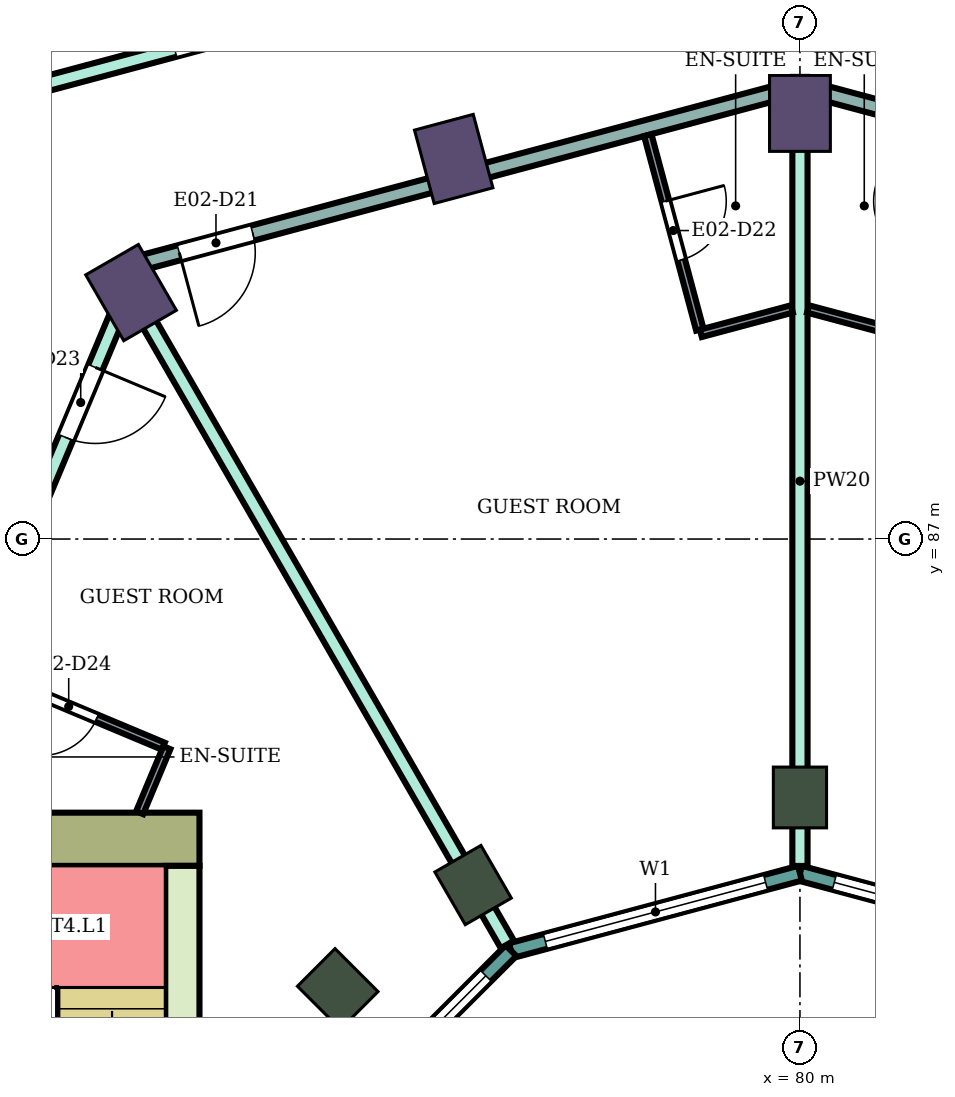
"""IFC4 building model, lengths in metres.
Left out: names, types, materials, properties, quantities, classifications, styles, units other than length and angle.
Written with IfcOpenShell. Run it as: python <this file> out.ifc"""

import sys

from ifc_helpers import new_model, si_unit, direction, frame, frame_2d, origin, origin_2d, place, context, subcontext, project, spatial, rectangle, extrude, element, fill, save


model = new_model("IFC4")
c1 = context("Model", 3, precision=1e-05, world=origin(), true_north=direction((0.0, 1.0)))
c2 = subcontext(c1, "Body", "Model", "MODEL_VIEW")
j1 = project(units=[si_unit("LENGTHUNIT", "METRE"), si_unit("PLANEANGLEUNIT", "RADIAN")], contexts=[c1])
p1 = place(None, origin())
s1 = spatial("IfcSite", under=j1, at=p1, CompositionType="ELEMENT")
p2 = place(p1, origin())
s2 = spatial("IfcBuilding", under=s1, at=p2, CompositionType="ELEMENT")
p3 = place(p2, frame((0.0, 0.0, 130.2)))
s3 = spatial("IfcBuildingStorey", under=s2, at=p3, CompositionType="ELEMENT", Elevation=130.2)
for number, where, z_axis, x_axis in (
    (1, (80.0, 92.6, 0.0), (0.0, 0.0, 1.0), (0.0, 1.0, 0.0)),
    (2, (75.445, 92.0, 0.0), (0.0, 0.0, 1.0), (-0.259, 0.966, 0.0)),
    (3, (71.2, 90.242, 0.0), (0.0, 0.0, 1.0), (-0.5, 0.866, 0.0)),
):
    element("IfcColumn", number, at=place(p3, frame(where, z_axis=z_axis, x_axis=x_axis)), inside=s3, PredefinedType="COLUMN", context=c2, shape_type="SweptSolid", body=[
        extrude(rectangle(XDim=1.0, YDim=0.8, at=origin_2d()), origin(), (0.0, 0.0, 1.0), 3.9),
    ])
for number, where, z_axis, x_axis in (
    (4, (80.0, 83.6, 0.0), (0.0, 0.0, 1.0), (0.0, 1.0, 0.0)),
    (5, (75.7, 82.448, 0.0), (0.0, 0.0, 1.0), (-0.5, 0.866, 0.0)),
    (6, (73.919, 81.081, 0.0), (0.0, 0.0, 1.0), (-0.707, 0.707, 0.0)),
):
    element("IfcColumn", number, at=place(p3, frame(where, z_axis=z_axis, x_axis=x_axis)), inside=s3, PredefinedType="COLUMN", context=c2, shape_type="SweptSolid", body=[
        extrude(rectangle(XDim=0.8, YDim=0.7, at=origin_2d()), origin(), (0.0, 0.0, 1.0), 3.9),
    ])
p4 = place(p3, frame((72.1, 83.05, 0.0), z_axis=(0.0, 0.0, 1.0), x_axis=(-1.0, 0.0, 0.0)))
e7 = element("IfcWall", 7, at=p4, inside=s3, PredefinedType="SHEAR", context=c2, shape_type="SweptSolid", body=[
    extrude(rectangle(XDim=14.8, YDim=0.7, at=frame_2d((7.4, 0.0))), origin(), (0.0, 0.0, 1.0), 3.58),
])
p5 = place(p4, frame((4.2, 0.0, 0.0)))
e8 = element("IfcOpeningElement", 8, at=p5, cuts=e7, PredefinedType="OPENING", context=c2, shape_type="SweptSolid", body=[
    extrude(rectangle(XDim=2.4, YDim=2.4, at=frame_2d((1.2, 1.2))), frame((0.0, 0.36, 0.0), z_axis=(0.0, -1.0, 0.0), x_axis=(1.0, 0.0, 0.0)), (0.0, 0.0, 1.0), 0.72),
])
p6 = place(p3, frame((71.875, 82.7, 0.0), z_axis=(0.0, 0.0, 1.0), x_axis=(0.0, -1.0, 0.0)))
e9 = element("IfcWall", 9, at=p6, inside=s3, PredefinedType="SHEAR", context=c2, shape_type="SweptSolid", body=[
    extrude(rectangle(XDim=7.7, YDim=0.45, at=frame_2d((3.85, 0.0))), origin(), (0.0, 0.0, 1.0), 3.58),
])
p7 = place(p3, frame((83.802, 81.585, 0.0), z_axis=(0.0, 0.0, 1.0), x_axis=(-0.965933654434, 0.258789828301, 0.0)))
e10 = element("IfcWall", 10, at=p7, inside=s3, PredefinedType="NOTDEFINED", context=c2, shape_type="SweptSolid", body=[
    extrude(rectangle(XDim=3.936, YDim=0.2, at=frame_2d((1.968, 0.0))), origin(), (0.0, 0.0, 1.0), 3.9),
])
p8 = place(p7, frame((0.468, 0.0, 0.9)))
e11 = element("IfcOpeningElement", 11, at=p8, cuts=e10, PredefinedType="OPENING", context=c2, shape_type="SweptSolid", body=[
    extrude(rectangle(XDim=3.0, YDim=2.3, at=frame_2d((1.5, 1.15))), frame((0.0, 0.11, 0.0), z_axis=(0.0, -1.0, 0.0), x_axis=(1.0, 0.0, 0.0)), (0.0, 0.0, 1.0), 0.22),
])
p9 = place(p3, frame((80.0, 82.604, 0.0), z_axis=(0.0, 0.0, 1.0), x_axis=(-0.965933654434, -0.258789828301, 0.0)))
e12 = element("IfcWall", 12, at=p9, inside=s3, PredefinedType="NOTDEFINED", context=c2, shape_type="SweptSolid", body=[
    extrude(rectangle(XDim=3.936, YDim=0.2, at=frame_2d((1.968, 0.0))), origin(), (0.0, 0.0, 1.0), 3.9),
])
p10 = place(p9, frame((0.468, 0.0, 0.9)))
e13 = element("IfcOpeningElement", 13, at=p10, cuts=e12, PredefinedType="OPENING", context=c2, shape_type="SweptSolid", body=[
    extrude(rectangle(XDim=3.0, YDim=2.3, at=frame_2d((1.5, 1.15))), frame((0.0, 0.11, 0.0), z_axis=(0.0, -1.0, 0.0), x_axis=(1.0, 0.0, 0.0)), (0.0, 0.0, 1.0), 0.22),
])
p11 = place(p3, frame((76.198, 81.585, 0.0), z_axis=(0.0, 0.0, 1.0), x_axis=(-0.707106781187, -0.707106781187, 0.0)))
e14 = element("IfcWall", 14, at=p11, inside=s3, PredefinedType="NOTDEFINED", context=c2, shape_type="SweptSolid", body=[
    extrude(rectangle(XDim=3.936, YDim=0.2, at=frame_2d((1.968, 0.0))), origin(), (0.0, 0.0, 1.0), 3.9),
])
p12 = place(p11, frame((0.468, 0.0, 0.9)))
e15 = element("IfcOpeningElement", 15, at=p12, cuts=e14, PredefinedType="OPENING", context=c2, shape_type="SweptSolid", body=[
    extrude(rectangle(XDim=3.0, YDim=2.3, at=frame_2d((1.5, 1.15))), frame((0.0, 0.11, 0.0), z_axis=(0.0, -1.0, 0.0), x_axis=(1.0, 0.0, 0.0)), (0.0, 0.0, 1.0), 0.22),
])
p13 = place(p3, frame((68.277, 83.4, 0.0), z_axis=(0.0, 0.0, 1.0), x_axis=(0.386454861164, 0.922308321703, 0.0)))
e16 = element("IfcWall", 16, at=p13, inside=s3, PredefinedType="PARTITIONING", context=c2, shape_type="SweptSolid", body=[
    extrude(rectangle(XDim=7.762, YDim=0.2, at=frame_2d((3.881, 0.0))), origin(), (0.0, 0.0, 1.0), 3.45),
])
p14 = place(p13, frame((5.351, 0.0, 0.0)))
e17 = element("IfcOpeningElement", 17, at=p14, cuts=e16, PredefinedType="OPENING", context=c2, shape_type="SweptSolid", body=[
    extrude(rectangle(XDim=1.0, YDim=2.1, at=frame_2d((0.5, 1.05))), frame((0.0, 0.11, 0.0), z_axis=(0.0, -1.0, 0.0), x_axis=(1.0, 0.0, 0.0)), (0.0, 0.0, 1.0), 0.22),
])
p15 = place(p3, frame((69.397, 92.805, 0.0), z_axis=(0.0, 0.0, 1.0), x_axis=(0.965971666602, 0.258647906087, 0.0)))
e18 = element("IfcWall", 18, at=p15, inside=s3, PredefinedType="PARTITIONING", context=c2, shape_type="SweptSolid", body=[
    extrude(rectangle(XDim=10.887, YDim=0.2, at=frame_2d((5.443, 0.0))), origin(), (0.0, 0.0, 1.0), 3.45),
])
p16 = place(p15, frame((6.163, 0.0, 0.0)))
e19 = element("IfcOpeningElement", 19, at=p16, cuts=e18, PredefinedType="OPENING", context=c2, shape_type="SweptSolid", body=[
    extrude(rectangle(XDim=1.0, YDim=2.1, at=frame_2d((0.5, 1.05))), frame((0.0, 0.11, 0.0), z_axis=(0.0, -1.0, 0.0), x_axis=(1.0, 0.0, 0.0)), (0.0, 0.0, 1.0), 0.22),
])
p17 = place(p15, frame((2.461, 0.0, 0.0)))
e20 = element("IfcOpeningElement", 20, at=p17, cuts=e18, PredefinedType="OPENING", context=c2, shape_type="SweptSolid", body=[
    extrude(rectangle(XDim=1.0, YDim=2.1, at=frame_2d((0.5, 1.05))), frame((0.0, 0.11, 0.0), z_axis=(0.0, -1.0, 0.0), x_axis=(1.0, 0.0, 0.0)), (0.0, 0.0, 1.0), 0.22),
])
p18 = place(p3, frame((71.263, 90.135, 0.0), z_axis=(0.0, 0.0, 1.0), x_axis=(0.499869438034, -0.86610077065, 0.0)))
e21 = element("IfcWall", 21, at=p18, inside=s3, PredefinedType="PARTITIONING", context=c2, shape_type="SweptSolid", body=[
    extrude(rectangle(XDim=9.777, YDim=0.2, at=frame_2d((4.889, 0.0))), origin(), (0.0, 0.0, 1.0), 3.45),
])
p19 = place(p3, frame((71.303, 90.625, 0.0), z_axis=(0.0, 0.0, 1.0), x_axis=(0.965971868307, 0.258647152776, 0.0)))
e22 = element("IfcWall", 22, at=p19, inside=s3, PredefinedType="PARTITIONING", context=c2, shape_type="SweptSolid", body=[
    extrude(rectangle(XDim=8.874, YDim=0.2, at=frame_2d((4.437, 0.0))), origin(), (0.0, 0.0, 1.0), 3.08),
])
p20 = place(p19, frame((0.55, 0.0, 0.0)))
e23 = element("IfcOpeningElement", 23, at=p20, cuts=e22, PredefinedType="OPENING", context=c2, shape_type="SweptSolid", body=[
    extrude(rectangle(XDim=1.0, YDim=2.1, at=frame_2d((0.5, 1.05))), frame((0.0, 0.11, 0.0), z_axis=(0.0, -1.0, 0.0), x_axis=(1.0, 0.0, 0.0)), (0.0, 0.0, 1.0), 0.22),
])
p21 = place(p3, frame((80.0, 82.699, 0.0), z_axis=(0.0, 0.0, 1.0), x_axis=(0.0, 1.0, 0.0)))
e24 = element("IfcWall", 24, at=p21, inside=s3, PredefinedType="PARTITIONING", context=c2, shape_type="SweptSolid", body=[
    extrude(rectangle(XDim=10.125, YDim=0.2, at=frame_2d((5.062, 0.0))), origin(), (0.0, 0.0, 1.0), 3.45),
])
p22 = place(p3, frame((80.0, 92.954, 0.0), z_axis=(0.0, 0.0, 1.0), x_axis=(0.96592536278, -0.258820774936, 0.0)))
e25 = element("IfcWall", 25, at=p22, inside=s3, PredefinedType="PARTITIONING", context=c2, shape_type="SweptSolid", body=[
    extrude(rectangle(XDim=8.934, YDim=0.2, at=frame_2d((4.467, 0.0))), origin(), (0.0, 0.0, 1.0), 3.08),
])
p23 = place(p22, frame((7.454, 0.0, 0.0)))
e26 = element("IfcOpeningElement", 26, at=p23, cuts=e25, PredefinedType="OPENING", context=c2, shape_type="SweptSolid", body=[
    extrude(rectangle(XDim=1.0, YDim=2.1, at=frame_2d((0.5, 1.05))), frame((0.0, 0.11, 0.0), z_axis=(0.0, -1.0, 0.0), x_axis=(1.0, 0.0, 0.0)), (0.0, 0.0, 1.0), 0.22),
])
p24 = place(p3, frame((80.0, 95.648, 0.0), z_axis=(0.0, 0.0, 1.0), x_axis=(0.965852259202, -0.259093445292, 0.0)))
e27 = element("IfcWall", 27, at=p24, inside=s3, PredefinedType="PARTITIONING", context=c2, shape_type="SweptSolid", body=[
    extrude(rectangle(XDim=10.597, YDim=0.2, at=frame_2d((5.298, 0.0))), origin(), (0.0, 0.0, 1.0), 3.45),
])
p25 = place(p24, frame((1.0, 0.0, 0.0)))
e28 = element("IfcOpeningElement", 28, at=p25, cuts=e27, PredefinedType="OPENING", context=c2, shape_type="SweptSolid", body=[
    extrude(rectangle(XDim=1.0, YDim=2.1, at=frame_2d((0.5, 1.05))), frame((0.0, 0.11, 0.0), z_axis=(0.0, -1.0, 0.0), x_axis=(1.0, 0.0, 0.0)), (0.0, 0.0, 1.0), 0.22),
])
p26 = place(p3, frame((69.181, 85.298, 0.0), z_axis=(0.0, 0.0, 1.0), x_axis=(0.922377635784, -0.38628939541, 0.0)))
e29 = element("IfcWall", 29, at=p26, inside=s3, PredefinedType="PARTITIONING", context=c2, shape_type="SweptSolid", body=[
    extrude(rectangle(XDim=2.65, YDim=0.1, at=frame_2d((1.325, 0.0))), origin(), (0.0, 0.0, 1.0), 3.45),
])
p27 = place(p26, frame((0.9, 0.0, 0.0)))
e30 = element("IfcOpeningElement", 30, at=p27, cuts=e29, PredefinedType="OPENING", context=c2, shape_type="SweptSolid", body=[
    extrude(rectangle(XDim=0.8, YDim=2.1, at=frame_2d((0.4, 1.05))), frame((0.0, 0.06, 0.0), z_axis=(0.0, -1.0, 0.0), x_axis=(1.0, 0.0, 0.0)), (0.0, 0.0, 1.0), 0.12),
])
p28 = place(p3, frame((71.313, 83.4, 0.0), z_axis=(0.0, 0.0, 1.0), x_axis=(0.386148512695, 0.922436624459, 0.0)))
e31 = element("IfcWall", 31, at=p28, inside=s3, PredefinedType="PARTITIONING", context=c2, shape_type="SweptSolid", body=[
    extrude(rectangle(XDim=0.927, YDim=0.1, at=frame_2d((0.463, 0.0))), origin(), (0.0, 0.0, 1.0), 3.45),
])
p29 = place(p3, frame((77.998, 92.314, 0.0), z_axis=(0.0, 0.0, 1.0), x_axis=(0.258608674509, -0.965982170368, 0.0)))
e32 = element("IfcWall", 32, at=p29, inside=s3, PredefinedType="PARTITIONING", context=c2, shape_type="SweptSolid", body=[
    extrude(rectangle(XDim=2.65, YDim=0.1, at=frame_2d((1.325, 0.0))), origin(), (0.0, 0.0, 1.0), 3.45),
])
p30 = place(p29, frame((0.9, 0.0, 0.0)))
e33 = element("IfcOpeningElement", 33, at=p30, cuts=e32, PredefinedType="OPENING", context=c2, shape_type="SweptSolid", body=[
    extrude(rectangle(XDim=0.8, YDim=2.1, at=frame_2d((0.4, 1.05))), frame((0.0, 0.06, 0.0), z_axis=(0.0, -1.0, 0.0), x_axis=(1.0, 0.0, 0.0)), (0.0, 0.0, 1.0), 0.12),
])
p31 = place(p3, frame((78.696, 89.706, 0.0), z_axis=(0.0, 0.0, 1.0), x_axis=(0.966002513606, 0.258532674351, 0.0)))
e34 = element("IfcWall", 34, at=p31, inside=s3, PredefinedType="PARTITIONING", context=c2, shape_type="SweptSolid", body=[
    extrude(rectangle(XDim=1.24, YDim=0.1, at=frame_2d((0.62, 0.0))), origin(), (0.0, 0.0, 1.0), 3.45),
])
p32 = place(p3, frame((80.106, 90.027, 0.0), z_axis=(0.0, 0.0, 1.0), x_axis=(0.966002973184, -0.258530957139, 0.0)))
e35 = element("IfcWall", 35, at=p32, inside=s3, PredefinedType="PARTITIONING", context=c2, shape_type="SweptSolid", body=[
    extrude(rectangle(XDim=1.19, YDim=0.1, at=frame_2d((0.595, 0.0))), origin(), (0.0, 0.0, 1.0), 3.45),
])
p33 = place(p8, origin())
e36 = element("IfcWindow", 36, at=p33, inside=s3, PartitioningType="SINGLE_PANEL", PredefinedType="WINDOW", context=c2, shape_type="SweptSolid", body=[
    extrude(rectangle(XDim=3.0, YDim=2.3, at=frame_2d((1.5, 1.15))), frame((0.0, 0.03, 0.0), z_axis=(0.0, -1.0, 0.0), x_axis=(1.0, 0.0, 0.0)), (0.0, 0.0, 1.0), 0.06),
])
fill(e11, e36)
p34 = place(p10, origin())
e37 = element("IfcWindow", 37, at=p34, inside=s3, PartitioningType="SINGLE_PANEL", PredefinedType="WINDOW", context=c2, shape_type="SweptSolid", body=[
    extrude(rectangle(XDim=3.0, YDim=2.3, at=frame_2d((1.5, 1.15))), frame((0.0, 0.03, 0.0), z_axis=(0.0, -1.0, 0.0), x_axis=(1.0, 0.0, 0.0)), (0.0, 0.0, 1.0), 0.06),
])
fill(e13, e37)
p35 = place(p12, origin())
e38 = element("IfcWindow", 38, at=p35, inside=s3, PartitioningType="SINGLE_PANEL", PredefinedType="WINDOW", context=c2, shape_type="SweptSolid", body=[
    extrude(rectangle(XDim=3.0, YDim=2.3, at=frame_2d((1.5, 1.15))), frame((0.0, 0.03, 0.0), z_axis=(0.0, -1.0, 0.0), x_axis=(1.0, 0.0, 0.0)), (0.0, 0.0, 1.0), 0.06),
])
fill(e15, e38)
p36 = place(p20, frame((1.0, 0.0, 0.0), z_axis=(0.0, 0.0, 1.0), x_axis=(-1.0, 0.0, 0.0)))
e39 = element("IfcDoor", 39, at=p36, inside=s3, OperationType="SINGLE_SWING_RIGHT", PredefinedType="DOOR", context=c2, shape_type="SweptSolid", body=[
    extrude(rectangle(XDim=1.0, YDim=2.1, at=frame_2d((0.5, 1.05))), frame((0.0, 0.025, 0.0), z_axis=(0.0, -1.0, 0.0), x_axis=(1.0, 0.0, 0.0)), (0.0, 0.0, 1.0), 0.05),
])
fill(e23, e39)
p37 = place(p30, origin())
e40 = element("IfcDoor", 40, at=p37, inside=s3, OperationType="SINGLE_SWING_LEFT", PredefinedType="DOOR", context=c2, shape_type="SweptSolid", body=[
    extrude(rectangle(XDim=0.8, YDim=2.1, at=frame_2d((0.4, 1.05))), frame((0.0, 0.025, 0.0), z_axis=(0.0, -1.0, 0.0), x_axis=(1.0, 0.0, 0.0)), (0.0, 0.0, 1.0), 0.05),
])
fill(e33, e40)
p38 = place(p14, frame((1.0, 0.0, 0.0), z_axis=(0.0, 0.0, 1.0), x_axis=(-1.0, 0.0, 0.0)))
e41 = element("IfcDoor", 41, at=p38, inside=s3, OperationType="SINGLE_SWING_LEFT", PredefinedType="DOOR", context=c2, shape_type="SweptSolid", body=[
    extrude(rectangle(XDim=1.0, YDim=2.1, at=frame_2d((0.5, 1.05))), frame((0.0, 0.025, 0.0), z_axis=(0.0, -1.0, 0.0), x_axis=(1.0, 0.0, 0.0)), (0.0, 0.0, 1.0), 0.05),
])
fill(e17, e41)
p39 = place(p27, frame((0.8, 0.0, 0.0), z_axis=(0.0, 0.0, 1.0), x_axis=(-1.0, 0.0, 0.0)))
e42 = element("IfcDoor", 42, at=p39, inside=s3, OperationType="SINGLE_SWING_RIGHT", PredefinedType="DOOR", context=c2, shape_type="SweptSolid", body=[
    extrude(rectangle(XDim=0.8, YDim=2.1, at=frame_2d((0.4, 1.05))), frame((0.0, 0.025, 0.0), z_axis=(0.0, -1.0, 0.0), x_axis=(1.0, 0.0, 0.0)), (0.0, 0.0, 1.0), 0.05),
])
fill(e30, e42)
save(model, sys.argv[1])
